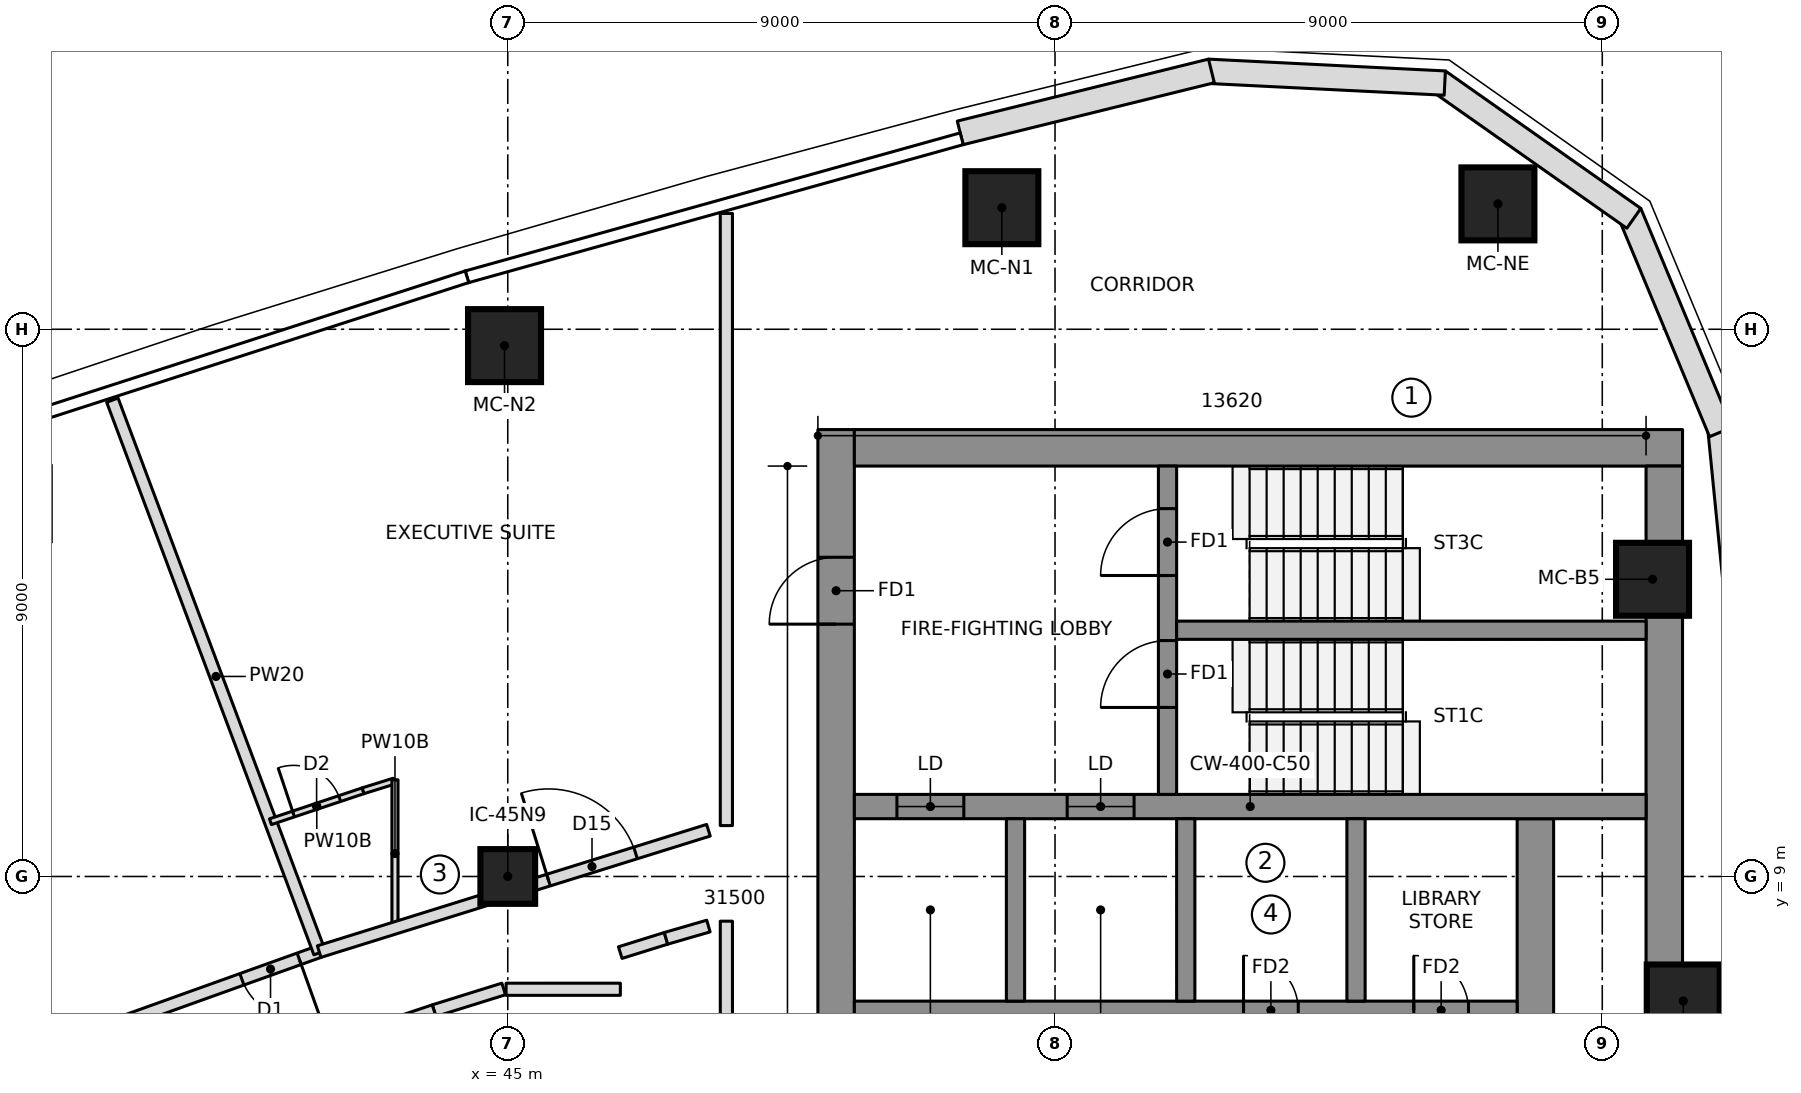
"""IFC4 building model, lengths in metres.
Left out: names, types, materials, properties, quantities, classifications, styles, units other than length and angle.
Written with IfcOpenShell. Run it as: python <this file> out.ifc"""

import sys

from ifc_helpers import new_model, si_unit, direction, frame, frame_2d, origin, origin_2d, place, context, subcontext, project, spatial, polyline, rectangle, outline, extrude, element, fill, save


model = new_model("IFC4")
c1 = context("Model", 3, precision=1e-05, world=origin(), true_north=direction((0.0, 1.0)))
c2 = subcontext(c1, "Body", "Model", "MODEL_VIEW")
j1 = project(units=[si_unit("LENGTHUNIT", "METRE"), si_unit("PLANEANGLEUNIT", "RADIAN")], contexts=[c1])
p1 = place(None, origin())
s1 = spatial("IfcSite", under=j1, at=p1, CompositionType="ELEMENT")
p2 = place(p1, origin())
s2 = spatial("IfcBuilding", under=s1, at=p2, CompositionType="ELEMENT")
p3 = place(p2, frame((0.0, 0.0, 235.0)))
s3 = spatial("IfcBuildingStorey", under=s2, at=p3, CompositionType="ELEMENT", Elevation=235.0)
p4 = place(p3, frame((50.4, 6.65, 0.0), z_axis=(0.0, 0.0, 1.0), x_axis=(0.0, 1.0, 0.0)))
e1 = element("IfcWall", 1, at=p4, inside=s3, PredefinedType="SHEAR", context=c2, shape_type="SweptSolid", body=[
    extrude(rectangle(XDim=9.7, YDim=0.6, at=frame_2d((4.85, 0.0))), origin(), (0.0, 0.0, 1.0), 3.55),
])
p5 = place(p4, frame((6.5, 0.0, 0.0)))
e2 = element("IfcOpeningElement", 2, at=p5, cuts=e1, PredefinedType="OPENING", context=c2, shape_type="SweptSolid", body=[
    extrude(rectangle(XDim=1.1, YDim=2.1, at=frame_2d((0.55, 1.05))), frame((0.0, 0.31, 0.0), z_axis=(0.0, -1.0, 0.0), x_axis=(1.0, 0.0, 0.0)), (0.0, 0.0, 1.0), 0.62),
])
p6 = place(p3, frame((50.7, 16.05, 0.0), z_axis=(0.0, 0.0, 1.0), x_axis=(1.0, 0.0, 0.0)))
e3 = element("IfcWall", 3, at=p6, inside=s3, PredefinedType="SHEAR", context=c2, shape_type="SweptSolid", body=[
    extrude(rectangle(XDim=13.62, YDim=0.6, at=frame_2d((6.81, 0.0))), origin(), (0.0, 0.0, 1.0), 3.55),
])
p7 = place(p3, frame((64.02, 7.502, 0.0), z_axis=(0.0, 0.0, 1.0), x_axis=(0.0, 1.0, 0.0)))
e4 = element("IfcWall", 4, at=p7, inside=s3, PredefinedType="SHEAR", context=c2, shape_type="SweptSolid", body=[
    extrude(rectangle(XDim=8.248, YDim=0.6, at=frame_2d((4.124, 0.0))), origin(), (0.0, 0.0, 1.0), 3.55),
])
p8 = place(p3, frame((61.9, -9.95, 0.0), z_axis=(0.0, 0.0, 1.0), x_axis=(0.0, 1.0, 0.0)))
e5 = element("IfcWall", 5, at=p8, inside=s3, PredefinedType="SHEAR", context=c2, shape_type="SweptSolid", body=[
    extrude(rectangle(XDim=19.9, YDim=0.6, at=frame_2d((9.95, 0.0))), origin(), (0.0, 0.0, 1.0), 3.55),
])
p9 = place(p3, frame((50.7, 10.15, 0.0), z_axis=(0.0, 0.0, 1.0), x_axis=(1.0, 0.0, 0.0)))
e6 = element("IfcWall", 6, at=p9, inside=s3, PredefinedType="SHEAR", context=c2, shape_type="SweptSolid", body=[
    extrude(rectangle(XDim=13.02, YDim=0.4, at=frame_2d((6.51, 0.0))), origin(), (0.0, 0.0, 1.0), 3.55),
])
p10 = place(p9, frame((0.7, 0.0, 0.0)))
e7 = element("IfcOpeningElement", 7, at=p10, cuts=e6, PredefinedType="OPENING", context=c2, shape_type="SweptSolid", body=[
    extrude(rectangle(XDim=1.1, YDim=2.1, at=frame_2d((0.55, 1.05))), frame((0.0, 0.21, 0.0), z_axis=(0.0, -1.0, 0.0), x_axis=(1.0, 0.0, 0.0)), (0.0, 0.0, 1.0), 0.42),
])
p11 = place(p9, frame((3.5, 0.0, 0.0)))
e8 = element("IfcOpeningElement", 8, at=p11, cuts=e6, PredefinedType="OPENING", context=c2, shape_type="SweptSolid", body=[
    extrude(rectangle(XDim=1.1, YDim=2.1, at=frame_2d((0.55, 1.05))), frame((0.0, 0.21, 0.0), z_axis=(0.0, -1.0, 0.0), x_axis=(1.0, 0.0, 0.0)), (0.0, 0.0, 1.0), 0.42),
])
p12 = place(p3, frame((50.7, 6.8, 0.0), z_axis=(0.0, 0.0, 1.0), x_axis=(1.0, 0.0, 0.0)))
e9 = element("IfcWall", 9, at=p12, inside=s3, PredefinedType="SHEAR", context=c2, shape_type="SweptSolid", body=[
    extrude(rectangle(XDim=10.9, YDim=0.3, at=frame_2d((5.45, 0.0))), origin(), (0.0, 0.0, 1.0), 3.55),
])
p13 = place(p12, frame((6.4, 0.0, 0.0)))
e10 = element("IfcOpeningElement", 10, at=p13, cuts=e9, PredefinedType="OPENING", context=c2, shape_type="SweptSolid", body=[
    extrude(rectangle(XDim=0.9, YDim=2.1, at=frame_2d((0.45, 1.05))), frame((0.0, 0.16, 0.0), z_axis=(0.0, -1.0, 0.0), x_axis=(1.0, 0.0, 0.0)), (0.0, 0.0, 1.0), 0.32),
])
p14 = place(p12, frame((9.2, 0.0, 0.0)))
e11 = element("IfcOpeningElement", 11, at=p14, cuts=e9, PredefinedType="OPENING", context=c2, shape_type="SweptSolid", body=[
    extrude(rectangle(XDim=0.9, YDim=2.1, at=frame_2d((0.45, 1.05))), frame((0.0, 0.16, 0.0), z_axis=(0.0, -1.0, 0.0), x_axis=(1.0, 0.0, 0.0)), (0.0, 0.0, 1.0), 0.32),
])
for number, where, z_axis, x_axis in (
    (12, (53.35, 6.95, 0.0), (0.0, 0.0, 1.0), (0.0, 1.0, 0.0)),
    (13, (56.15, 6.95, 0.0), (0.0, 0.0, 1.0), (0.0, 1.0, 0.0)),
    (14, (58.95, 6.95, 0.0), (0.0, 0.0, 1.0), (0.0, 1.0, 0.0)),
):
    element("IfcWall", number, at=place(p3, frame(where, z_axis=z_axis, x_axis=x_axis)), inside=s3, PredefinedType="SHEAR", context=c2, shape_type="SweptSolid", body=[
        extrude(rectangle(XDim=3.0, YDim=0.3, at=frame_2d((1.5, 0.0))), origin(), (0.0, 0.0, 1.0), 3.55),
    ])
p15 = place(p3, frame((55.85, 10.35, 0.0), z_axis=(0.0, 0.0, 1.0), x_axis=(0.0, 1.0, 0.0)))
e15 = element("IfcWall", 15, at=p15, inside=s3, PredefinedType="SHEAR", context=c2, shape_type="SweptSolid", body=[
    extrude(rectangle(XDim=5.4, YDim=0.3, at=frame_2d((2.7, 0.0))), origin(), (0.0, 0.0, 1.0), 3.55),
])
p16 = place(p15, frame((1.43, 0.0, 0.0)))
e16 = element("IfcOpeningElement", 16, at=p16, cuts=e15, PredefinedType="OPENING", context=c2, shape_type="SweptSolid", body=[
    extrude(rectangle(XDim=1.1, YDim=2.1, at=frame_2d((0.55, 1.05))), frame((0.0, 0.16, 0.0), z_axis=(0.0, -1.0, 0.0), x_axis=(1.0, 0.0, 0.0)), (0.0, 0.0, 1.0), 0.32),
])
p17 = place(p15, frame((3.6, 0.0, 0.0)))
e17 = element("IfcOpeningElement", 17, at=p17, cuts=e15, PredefinedType="OPENING", context=c2, shape_type="SweptSolid", body=[
    extrude(rectangle(XDim=1.1, YDim=2.1, at=frame_2d((0.55, 1.05))), frame((0.0, 0.16, 0.0), z_axis=(0.0, -1.0, 0.0), x_axis=(1.0, 0.0, 0.0)), (0.0, 0.0, 1.0), 0.32),
])
p18 = place(p3, frame((56.0, 13.05, 0.0), z_axis=(0.0, 0.0, 1.0), x_axis=(1.0, 0.0, 0.0)))
e18 = element("IfcWall", 18, at=p18, inside=s3, PredefinedType="SHEAR", context=c2, shape_type="SweptSolid", body=[
    extrude(rectangle(XDim=7.72, YDim=0.3, at=frame_2d((3.86, 0.0))), origin(), (0.0, 0.0, 1.0), 3.55),
])
for number, where, z_axis, x_axis in (
    (19, (64.332, 6.952, 0.0), (0.0, 0.0, 1.0), (1.0, 0.0, 0.0)),
    (20, (63.826, 13.888, 0.0), (0.0, 0.0, 1.0), (1.0, 0.0, 0.0)),
    (21, (61.284, 20.062, 0.0), (0.0, 0.0, 1.0), (1.0, 0.0, 0.0)),
    (22, (53.125, 20.0, 0.0), (0.0, 0.0, 1.0), (1.0, 0.0, 0.0)),
    (23, (44.947, 17.731, 0.0), (0.0, 0.0, 1.0), (1.0, 0.0, 0.0)),
):
    element("IfcColumn", number, at=place(p3, frame(where, z_axis=z_axis, x_axis=x_axis)), inside=s3, PredefinedType="COLUMN", context=c2, shape_type="SweptSolid", body=[
        extrude(rectangle(XDim=1.2, YDim=1.2, at=origin_2d()), origin(), (0.0, 0.0, 1.0), 3.55),
    ])
p19 = place(p3, frame((45.0, 9.0, 0.0), z_axis=(0.0, 0.0, 1.0), x_axis=(1.0, 0.0, 0.0)))
e24 = element("IfcColumn", 24, at=p19, inside=s3, PredefinedType="COLUMN", context=c2, shape_type="SweptSolid", body=[
    extrude(rectangle(XDim=0.9, YDim=0.9, at=origin_2d()), origin(), (0.0, 0.0, 1.0), 3.55),
])
p20 = place(p3, frame((65.342, 12.264, 0.0), z_axis=(0.0, 0.0, 1.0), x_axis=(-0.098718218066, 0.995115427185, 0.0)))
e25 = element("IfcWall", 25, at=p20, inside=s3, PredefinedType="NOTDEFINED", context=c2, shape_type="SweptSolid", body=[
    extrude(outline(polyline([(-0.003, -0.2), (4.123, -0.2), (4.063, 0.2), (0.003, 0.2), (-0.003, -0.2)])), origin(), (0.0, 0.0, 1.0), 3.25),
])
p21 = place(p3, frame((64.938, 16.337, 0.0), z_axis=(0.0, 0.0, 1.0), x_axis=(-0.3844335483, 0.923152667191, 0.0)))
e26 = element("IfcWall", 26, at=p21, inside=s3, PredefinedType="NOTDEFINED", context=c2, shape_type="SweptSolid", body=[
    extrude(outline(polyline([(-0.03, -0.2), (3.871, -0.2), (3.756, 0.2), (0.03, 0.2), (-0.03, -0.2)])), origin(), (0.0, 0.0, 1.0), 3.25),
])
p22 = place(p3, frame((63.471, 19.858, 0.0), z_axis=(0.0, 0.0, 1.0), x_axis=(-0.817942545532, 0.575299915009, 0.0)))
e27 = element("IfcWall", 27, at=p22, inside=s3, PredefinedType="NOTDEFINED", context=c2, shape_type="SweptSolid", body=[
    extrude(outline(polyline([(-0.058, -0.2), (3.871, -0.2), (3.756, 0.2), (0.058, 0.2), (-0.058, -0.2)])), origin(), (0.0, 0.0, 1.0), 3.25),
])
p23 = place(p3, frame((60.352, 22.052, 0.0), z_axis=(0.0, 0.0, 1.0), x_axis=(-0.998758875872, 0.049806705046, 0.0)))
e28 = element("IfcWall", 28, at=p23, inside=s3, PredefinedType="NOTDEFINED", context=c2, shape_type="SweptSolid", body=[
    extrude(outline(polyline([(-0.058, -0.2), (3.843, -0.2), (3.784, 0.2), (0.058, 0.2), (-0.058, -0.2)])), origin(), (0.0, 0.0, 1.0), 3.25),
])
p24 = place(p3, frame((56.543, 22.242, 0.0), z_axis=(0.0, 0.0, 1.0), x_axis=(-0.970902342456, -0.23947576373, 0.0)))
e29 = element("IfcWall", 29, at=p24, inside=s3, PredefinedType="NOTDEFINED", context=c2, shape_type="SweptSolid", body=[
    extrude(outline(polyline([(-0.029, -0.2), (4.226, -0.2), (4.226, 0.2), (0.029, 0.2), (-0.029, -0.2)])), origin(), (0.0, 0.0, 1.0), 3.25),
])
p25 = place(p3, frame((41.898, 7.764, 0.0), z_axis=(0.0, 0.0, 1.0), x_axis=(-0.941277643829, -0.337633525034, 0.0)))
e30 = element("IfcWall", 30, at=p25, inside=s3, PredefinedType="PARTITIONING", context=c2, shape_type="SweptSolid", body=[
    extrude(rectangle(XDim=10.001, YDim=0.2, at=frame_2d((5.0, 0.0))), origin(), (0.0, 0.0, 1.0), 3.25),
])
p26 = place(p25, frame((0.35, 0.0, 0.0)))
e31 = element("IfcOpeningElement", 31, at=p26, cuts=e30, PredefinedType="OPENING", context=c2, shape_type="SweptSolid", body=[
    extrude(rectangle(XDim=1.0, YDim=2.1, at=frame_2d((0.5, 1.05))), frame((0.0, 0.11, 0.0), z_axis=(0.0, -1.0, 0.0), x_axis=(1.0, 0.0, 0.0)), (0.0, 0.0, 1.0), 0.22),
])
p27 = place(p3, frame((41.906, 7.746, 0.0), z_axis=(0.0, 0.0, 1.0), x_axis=(-0.35112895446, 0.936327110224, 0.0)))
e32 = element("IfcWall", 32, at=p27, inside=s3, PredefinedType="PARTITIONING", context=c2, shape_type="SweptSolid", body=[
    extrude(rectangle(XDim=9.706, YDim=0.2, at=frame_2d((4.853, 0.0))), origin(), (0.0, 0.0, 1.0), 3.25),
])
p28 = place(p3, frame((41.097, 9.901, 0.0), z_axis=(0.0, 0.0, 1.0), x_axis=(0.948485479965, 0.3168206027, 0.0)))
e33 = element("IfcWall", 33, at=p28, inside=s3, PredefinedType="PARTITIONING", context=c2, shape_type="SweptSolid", body=[
    extrude(rectangle(XDim=1.606, YDim=0.1, at=frame_2d((0.803, 0.0))), origin(), (0.0, 0.0, 1.0), 3.25),
])
p29 = place(p28, frame((0.4, 0.0, 0.0)))
e34 = element("IfcOpeningElement", 34, at=p29, cuts=e33, PredefinedType="OPENING", context=c2, shape_type="SweptSolid", body=[
    extrude(rectangle(XDim=0.8, YDim=2.1, at=frame_2d((0.4, 1.05))), frame((0.0, 0.06, 0.0), z_axis=(0.0, -1.0, 0.0), x_axis=(1.0, 0.0, 0.0)), (0.0, 0.0, 1.0), 0.12),
])
p30 = place(p3, frame((42.621, 10.409, 0.0), z_axis=(0.0, 0.0, 1.0), x_axis=(0.954618903587, 0.297830067176, 0.0)))
e35 = element("IfcWall", 35, at=p30, inside=s3, PredefinedType="PARTITIONING", context=c2, shape_type="SweptSolid", body=[
    extrude(rectangle(XDim=0.531, YDim=0.1, at=frame_2d((0.266, 0.0))), origin(), (0.0, 0.0, 1.0), 3.25),
])
p31 = place(p3, frame((43.788, 6.793, 0.0), z_axis=(0.0, 0.0, 1.0), x_axis=(0.954693570678, 0.29759063511, 0.0)))
e36 = element("IfcWall", 36, at=p31, inside=s3, PredefinedType="PARTITIONING", context=c2, shape_type="SweptSolid", body=[
    extrude(rectangle(XDim=1.198, YDim=0.2, at=frame_2d((0.599, 0.0))), origin(), (0.0, 0.0, 1.0), 3.25),
])
p32 = place(p3, frame((46.85, 7.748, 0.0), z_axis=(0.0, 0.0, 1.0), x_axis=(0.95461224237, 0.297851417181, 0.0)))
e37 = element("IfcWall", 37, at=p32, inside=s3, PredefinedType="PARTITIONING", context=c2, shape_type="SweptSolid", body=[
    extrude(rectangle(XDim=0.788, YDim=0.2, at=frame_2d((0.394, 0.0))), origin(), (0.0, 0.0, 1.0), 3.25),
])
p33 = place(p3, frame((42.078, 6.222, 0.0), z_axis=(0.0, 0.0, 1.0), x_axis=(0.948466406859, 0.316877697323, 0.0)))
e38 = element("IfcWall", 38, at=p33, inside=s3, PredefinedType="PARTITIONING", context=c2, shape_type="SweptSolid", body=[
    extrude(rectangle(XDim=1.803, YDim=0.2, at=frame_2d((0.901, 0.0))), origin(), (0.0, 0.0, 1.0), 3.25),
])
p34 = place(p3, frame((43.145, 10.59, 0.0), z_axis=(0.0, 0.0, 1.0), x_axis=(0.0, -1.0, 0.0)))
e39 = element("IfcWall", 39, at=p34, inside=s3, PredefinedType="PARTITIONING", context=c2, shape_type="SweptSolid", body=[
    extrude(rectangle(XDim=2.425, YDim=0.1, at=frame_2d((1.213, 0.0))), origin(), (0.0, 0.0, 1.0), 3.25),
])
p35 = place(p3, frame((41.898, 7.764, 0.0), z_axis=(0.0, 0.0, 1.0), x_axis=(0.954667015156, 0.297675813886, 0.0)))
e40 = element("IfcWall", 40, at=p35, inside=s3, PredefinedType="PARTITIONING", context=c2, shape_type="SweptSolid", body=[
    extrude(rectangle(XDim=6.706, YDim=0.2, at=frame_2d((3.353, 0.0))), origin(), (0.0, 0.0, 1.0), 3.25),
])
p36 = place(p35, frame((3.95, 0.0, 0.0)))
e41 = element("IfcOpeningElement", 41, at=p36, cuts=e40, PredefinedType="OPENING", context=c2, shape_type="SweptSolid", body=[
    extrude(rectangle(XDim=1.5, YDim=2.1, at=frame_2d((0.75, 1.05))), frame((0.0, 0.11, 0.0), z_axis=(0.0, -1.0, 0.0), x_axis=(1.0, 0.0, 0.0)), (0.0, 0.0, 1.0), 0.22),
])
p37 = place(p3, frame((47.602, 7.982, 0.0), z_axis=(0.0, 0.0, 1.0), x_axis=(0.960439023181, 0.278490363839, 0.0)))
e42 = element("IfcWall", 42, at=p37, inside=s3, PredefinedType="PARTITIONING", context=c2, shape_type="SweptSolid", body=[
    extrude(rectangle(XDim=0.727, YDim=0.2, at=frame_2d((0.363, 0.0))), origin(), (0.0, 0.0, 1.0), 3.25),
])
p38 = place(p3, frame((44.972, 7.145, 0.0), z_axis=(0.0, 0.0, 1.0), x_axis=(0.99999999156, 0.000129920747, 0.0)))
e43 = element("IfcWall", 43, at=p38, inside=s3, PredefinedType="PARTITIONING", context=c2, shape_type="SweptSolid", body=[
    extrude(rectangle(XDim=1.879, YDim=0.2, at=frame_2d((0.939, 0.0))), origin(), (0.0, 0.0, 1.0), 3.25),
])
p39 = place(p3, frame((48.595, 8.265, 0.0), z_axis=(0.0, 0.0, 1.0), x_axis=(0.0, -1.0, 0.0)))
e44 = element("IfcWall", 44, at=p39, inside=s3, PredefinedType="PARTITIONING", context=c2, shape_type="SweptSolid", body=[
    extrude(rectangle(XDim=16.53, YDim=0.2, at=frame_2d((8.265, 0.0))), origin(), (0.0, 0.0, 1.0), 3.25),
])
p40 = place(p3, frame((48.595, 19.904, 0.0), z_axis=(0.0, 0.0, 1.0), x_axis=(0.0, -1.0, 0.0)))
e45 = element("IfcWall", 45, at=p40, inside=s3, PredefinedType="PARTITIONING", context=c2, shape_type="SweptSolid", body=[
    extrude(rectangle(XDim=10.067, YDim=0.2, at=frame_2d((5.034, 0.0))), origin(), (0.0, 0.0, 1.0), 3.25),
])
p41 = place(p26, origin())
e46 = element("IfcDoor", 46, at=p41, inside=s3, OperationType="SINGLE_SWING_LEFT", PredefinedType="DOOR", context=c2, shape_type="SweptSolid", body=[
    extrude(rectangle(XDim=1.0, YDim=2.1, at=frame_2d((0.5, 1.05))), frame((0.0, 0.025, 0.0), z_axis=(0.0, -1.0, 0.0), x_axis=(1.0, 0.0, 0.0)), (0.0, 0.0, 1.0), 0.05),
])
fill(e31, e46)
p42 = place(p29, origin())
e47 = element("IfcDoor", 47, at=p42, inside=s3, OperationType="SINGLE_SWING_LEFT", PredefinedType="DOOR", context=c2, shape_type="SweptSolid", body=[
    extrude(rectangle(XDim=0.8, YDim=2.1, at=frame_2d((0.4, 1.05))), frame((0.0, 0.025, 0.0), z_axis=(0.0, -1.0, 0.0), x_axis=(1.0, 0.0, 0.0)), (0.0, 0.0, 1.0), 0.05),
])
fill(e34, e47)
p43 = place(p36, origin())
e48 = element("IfcDoor", 48, at=p43, inside=s3, OperationType="DOUBLE_DOOR_SINGLE_SWING", PredefinedType="DOOR", context=c2, shape_type="SweptSolid", body=[
    extrude(rectangle(XDim=1.5, YDim=2.1, at=frame_2d((0.75, 1.05))), frame((0.0, 0.025, 0.0), z_axis=(0.0, -1.0, 0.0), x_axis=(1.0, 0.0, 0.0)), (0.0, 0.0, 1.0), 0.05),
])
fill(e41, e48)
p44 = place(p10, origin())
e49 = element("IfcDoor", 49, at=p44, inside=s3, OperationType="DOUBLE_DOOR_SLIDING", PredefinedType="DOOR", context=c2, shape_type="SweptSolid", body=[
    extrude(rectangle(XDim=1.1, YDim=2.1, at=frame_2d((0.55, 1.05))), frame((0.0, 0.025, 0.0), z_axis=(0.0, -1.0, 0.0), x_axis=(1.0, 0.0, 0.0)), (0.0, 0.0, 1.0), 0.05),
])
fill(e7, e49)
p45 = place(p11, origin())
e50 = element("IfcDoor", 50, at=p45, inside=s3, OperationType="DOUBLE_DOOR_SLIDING", PredefinedType="DOOR", context=c2, shape_type="SweptSolid", body=[
    extrude(rectangle(XDim=1.1, YDim=2.1, at=frame_2d((0.55, 1.05))), frame((0.0, 0.025, 0.0), z_axis=(0.0, -1.0, 0.0), x_axis=(1.0, 0.0, 0.0)), (0.0, 0.0, 1.0), 0.05),
])
fill(e8, e50)
p46 = place(p16, origin())
e51 = element("IfcDoor", 51, at=p46, inside=s3, OperationType="SINGLE_SWING_RIGHT", PredefinedType="DOOR", context=c2, shape_type="SweptSolid", body=[
    extrude(rectangle(XDim=1.1, YDim=2.1, at=frame_2d((0.55, 1.05))), frame((0.0, 0.025, 0.0), z_axis=(0.0, -1.0, 0.0), x_axis=(1.0, 0.0, 0.0)), (0.0, 0.0, 1.0), 0.05),
])
fill(e16, e51)
p47 = place(p17, origin())
e52 = element("IfcDoor", 52, at=p47, inside=s3, OperationType="SINGLE_SWING_RIGHT", PredefinedType="DOOR", context=c2, shape_type="SweptSolid", body=[
    extrude(rectangle(XDim=1.1, YDim=2.1, at=frame_2d((0.55, 1.05))), frame((0.0, 0.025, 0.0), z_axis=(0.0, -1.0, 0.0), x_axis=(1.0, 0.0, 0.0)), (0.0, 0.0, 1.0), 0.05),
])
fill(e17, e52)
p48 = place(p5, origin())
e53 = element("IfcDoor", 53, at=p48, inside=s3, OperationType="SINGLE_SWING_RIGHT", PredefinedType="DOOR", context=c2, shape_type="SweptSolid", body=[
    extrude(rectangle(XDim=1.1, YDim=2.1, at=frame_2d((0.55, 1.05))), frame((0.0, 0.025, 0.0), z_axis=(0.0, -1.0, 0.0), x_axis=(1.0, 0.0, 0.0)), (0.0, 0.0, 1.0), 0.05),
])
fill(e2, e53)
p49 = place(p13, origin())
e54 = element("IfcDoor", 54, at=p49, inside=s3, OperationType="SINGLE_SWING_LEFT", PredefinedType="DOOR", context=c2, shape_type="SweptSolid", body=[
    extrude(rectangle(XDim=0.9, YDim=2.1, at=frame_2d((0.45, 1.05))), frame((0.0, 0.025, 0.0), z_axis=(0.0, -1.0, 0.0), x_axis=(1.0, 0.0, 0.0)), (0.0, 0.0, 1.0), 0.05),
])
fill(e10, e54)
p50 = place(p14, origin())
e55 = element("IfcDoor", 55, at=p50, inside=s3, OperationType="SINGLE_SWING_LEFT", PredefinedType="DOOR", context=c2, shape_type="SweptSolid", body=[
    extrude(rectangle(XDim=0.9, YDim=2.1, at=frame_2d((0.45, 1.05))), frame((0.0, 0.025, 0.0), z_axis=(0.0, -1.0, 0.0), x_axis=(1.0, 0.0, 0.0)), (0.0, 0.0, 1.0), 0.05),
])
fill(e11, e55)
save(model, sys.argv[1])
